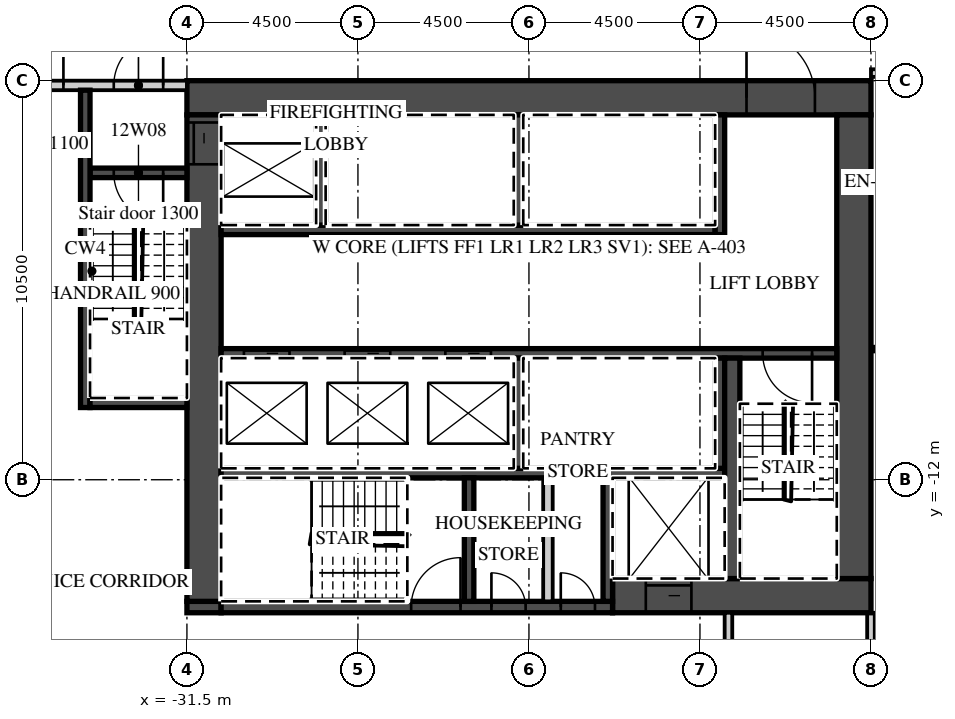
"""IFC4 building model, lengths in metres.
Left out: names, types, materials, properties, quantities, classifications, styles, units other than length and angle.
Written with IfcOpenShell. Run it as: python <this file> out.ifc"""

import sys

from ifc_helpers import new_model, si_unit, direction, frame, frame_2d, origin, place, context, subcontext, project, spatial, rectangle, extrude, element, fill, save


model = new_model("IFC4")
c1 = context("Model", 3, precision=1e-05, world=origin(), true_north=direction((0.0, 1.0)))
c2 = subcontext(c1, "Body", "Model", "MODEL_VIEW")
j1 = project(units=[si_unit("LENGTHUNIT", "METRE"), si_unit("PLANEANGLEUNIT", "RADIAN")], contexts=[c1])
p1 = place(None, origin())
s1 = spatial("IfcSite", under=j1, at=p1, CompositionType="ELEMENT")
p2 = place(p1, origin())
s2 = spatial("IfcBuilding", under=s1, at=p2, CompositionType="ELEMENT")
p3 = place(p2, frame((0.0, 0.0, 69.9)))
s3 = spatial("IfcBuildingStorey", under=s2, at=p3, CompositionType="ELEMENT", Elevation=69.9)
p4 = place(p3, frame((-13.5, -21.55, 0.0), z_axis=(0.0, 0.0, 1.0), x_axis=(0.0, 1.0, 0.0)))
e1 = element("IfcWall", 1, at=p4, inside=s3, PredefinedType="PARTITIONING", context=c2, shape_type="SweptSolid", body=[
    extrude(rectangle(XDim=6.05, YDim=0.2, at=frame_2d((3.025, 0.0))), origin(), (0.0, 0.0, 1.0), 3.02),
])
p5 = place(p3, frame((-13.5, -1.3, 0.0), z_axis=(0.0, 0.0, 1.0), x_axis=(1.0, 0.0, 0.0)))
e2 = element("IfcWall", 2, at=p5, inside=s3, PredefinedType="PARTITIONING", context=c2, shape_type="SweptSolid", body=[
    extrude(rectangle(XDim=58.05, YDim=0.2, at=frame_2d((29.025, 0.0))), origin(), (0.0, 0.0, 1.0), 3.02),
])
p6 = place(p5, frame((2.925, 0.0, 0.0)))
e3 = element("IfcOpeningElement", 3, at=p6, cuts=e2, PredefinedType="OPENING", context=c2, shape_type="SweptSolid", body=[
    extrude(rectangle(XDim=1.0, YDim=2.1, at=frame_2d((0.5, 1.05))), frame((0.0, 0.11, 0.0), z_axis=(0.0, -1.0, 0.0), x_axis=(1.0, 0.0, 0.0)), (0.0, 0.0, 1.0), 0.22),
])
p7 = place(p5, frame((5.075, 0.0, 0.0)))
e4 = element("IfcOpeningElement", 4, at=p7, cuts=e2, PredefinedType="OPENING", context=c2, shape_type="SweptSolid", body=[
    extrude(rectangle(XDim=1.0, YDim=2.1, at=frame_2d((0.5, 1.05))), frame((0.0, 0.11, 0.0), z_axis=(0.0, -1.0, 0.0), x_axis=(1.0, 0.0, 0.0)), (0.0, 0.0, 1.0), 0.22),
])
p8 = place(p5, frame((9.55, 0.0, 0.0)))
e5 = element("IfcOpeningElement", 5, at=p8, cuts=e2, PredefinedType="OPENING", context=c2, shape_type="SweptSolid", body=[
    extrude(rectangle(XDim=1.0, YDim=2.1, at=frame_2d((0.5, 1.05))), frame((0.0, 0.11, 0.0), z_axis=(0.0, -1.0, 0.0), x_axis=(1.0, 0.0, 0.0)), (0.0, 0.0, 1.0), 0.22),
])
p9 = place(p5, frame((18.862, 0.0, 0.0)))
e6 = element("IfcOpeningElement", 6, at=p9, cuts=e2, PredefinedType="OPENING", context=c2, shape_type="SweptSolid", body=[
    extrude(rectangle(XDim=1.2, YDim=2.1, at=frame_2d((0.6, 1.05))), frame((0.0, 0.11, 0.0), z_axis=(0.0, -1.0, 0.0), x_axis=(1.0, 0.0, 0.0)), (0.0, 0.0, 1.0), 0.22),
])
p10 = place(p5, frame((27.862, 0.0, 0.0)))
e7 = element("IfcOpeningElement", 7, at=p10, cuts=e2, PredefinedType="OPENING", context=c2, shape_type="SweptSolid", body=[
    extrude(rectangle(XDim=1.2, YDim=2.1, at=frame_2d((0.6, 1.05))), frame((0.0, 0.11, 0.0), z_axis=(0.0, -1.0, 0.0), x_axis=(1.0, 0.0, 0.0)), (0.0, 0.0, 1.0), 0.22),
])
p11 = place(p5, frame((34.45, 0.0, 0.0)))
e8 = element("IfcOpeningElement", 8, at=p11, cuts=e2, PredefinedType="OPENING", context=c2, shape_type="SweptSolid", body=[
    extrude(rectangle(XDim=1.0, YDim=2.1, at=frame_2d((0.5, 1.05))), frame((0.0, 0.11, 0.0), z_axis=(0.0, -1.0, 0.0), x_axis=(1.0, 0.0, 0.0)), (0.0, 0.0, 1.0), 0.22),
])
p12 = place(p5, frame((38.925, 0.0, 0.0)))
e9 = element("IfcOpeningElement", 9, at=p12, cuts=e2, PredefinedType="OPENING", context=c2, shape_type="SweptSolid", body=[
    extrude(rectangle(XDim=1.0, YDim=2.1, at=frame_2d((0.5, 1.05))), frame((0.0, 0.11, 0.0), z_axis=(0.0, -1.0, 0.0), x_axis=(1.0, 0.0, 0.0)), (0.0, 0.0, 1.0), 0.22),
])
p13 = place(p5, frame((45.862, 0.0, 0.0)))
e10 = element("IfcOpeningElement", 10, at=p13, cuts=e2, PredefinedType="OPENING", context=c2, shape_type="SweptSolid", body=[
    extrude(rectangle(XDim=1.2, YDim=2.1, at=frame_2d((0.6, 1.05))), frame((0.0, 0.11, 0.0), z_axis=(0.0, -1.0, 0.0), x_axis=(1.0, 0.0, 0.0)), (0.0, 0.0, 1.0), 0.22),
])
p14 = place(p5, frame((50.075, 0.0, 0.0)))
e11 = element("IfcOpeningElement", 11, at=p14, cuts=e2, PredefinedType="OPENING", context=c2, shape_type="SweptSolid", body=[
    extrude(rectangle(XDim=1.0, YDim=2.1, at=frame_2d((0.5, 1.05))), frame((0.0, 0.11, 0.0), z_axis=(0.0, -1.0, 0.0), x_axis=(1.0, 0.0, 0.0)), (0.0, 0.0, 1.0), 0.22),
])
p15 = place(p5, frame((56.525, 0.0, 0.0)))
e12 = element("IfcOpeningElement", 12, at=p15, cuts=e2, PredefinedType="OPENING", context=c2, shape_type="SweptSolid", body=[
    extrude(rectangle(XDim=1.0, YDim=2.1, at=frame_2d((0.5, 1.05))), frame((0.0, 0.11, 0.0), z_axis=(0.0, -1.0, 0.0), x_axis=(1.0, 0.0, 0.0)), (0.0, 0.0, 1.0), 0.22),
])
p16 = place(p3, frame((-31.5, -1.95, 0.0), z_axis=(0.0, 0.0, 1.0), x_axis=(1.0, 0.0, 0.0)))
e13 = element("IfcWall", 13, at=p16, inside=s3, PredefinedType="SHEAR", context=c2, shape_type="SweptSolid", body=[
    extrude(rectangle(XDim=18.0, YDim=0.9, at=frame_2d((9.0, 0.0))), origin(), (0.0, 0.0, 1.0), 3.02),
])
p17 = place(p16, frame((14.725, 0.0, 0.0)))
e14 = element("IfcOpeningElement", 14, at=p17, cuts=e13, PredefinedType="OPENING", context=c2, shape_type="SweptSolid", body=[
    extrude(rectangle(XDim=1.8, YDim=2.1, at=frame_2d((0.9, 1.05))), frame((0.0, 0.46, 0.0), z_axis=(0.0, -1.0, 0.0), x_axis=(1.0, 0.0, 0.0)), (0.0, 0.0, 1.0), 0.92),
])
p18 = place(p3, frame((-20.3, -15.05, 0.0), z_axis=(0.0, 0.0, 1.0), x_axis=(1.0, 0.0, 0.0)))
e15 = element("IfcWall", 15, at=p18, inside=s3, PredefinedType="SHEAR", context=c2, shape_type="SweptSolid", body=[
    extrude(rectangle(XDim=6.8, YDim=0.9, at=frame_2d((3.4, 0.0))), origin(), (0.0, 0.0, 1.0), 3.02),
])
p19 = place(p18, frame((0.875, 0.0, 0.0)))
e16 = element("IfcOpeningElement", 16, at=p19, cuts=e15, PredefinedType="OPENING", context=c2, shape_type="SweptSolid", body=[
    extrude(rectangle(XDim=1.2, YDim=2.1, at=frame_2d((0.6, 1.05))), frame((0.0, 0.46, 0.0), z_axis=(0.0, -1.0, 0.0), x_axis=(1.0, 0.0, 0.0)), (0.0, 0.0, 1.0), 0.92),
])
p20 = place(p3, frame((-31.5, -15.35, 0.0), z_axis=(0.0, 0.0, 1.0), x_axis=(1.0, 0.0, 0.0)))
e17 = element("IfcWall", 17, at=p20, inside=s3, PredefinedType="SHEAR", context=c2, shape_type="SweptSolid", body=[
    extrude(rectangle(XDim=0.9, YDim=0.3, at=frame_2d((0.45, 0.0))), origin(), (0.0, 0.0, 1.0), 3.02),
])
p21 = place(p3, frame((-30.6, -15.35, 0.0), z_axis=(0.0, 0.0, 1.0), x_axis=(1.0, 0.0, 0.0)))
e18 = element("IfcWall", 18, at=p21, inside=s3, PredefinedType="SHEAR", context=c2, shape_type="SweptSolid", body=[
    extrude(rectangle(XDim=10.3, YDim=0.3, at=frame_2d((5.15, 0.0))), origin(), (0.0, 0.0, 1.0), 3.02),
])
p22 = place(p21, frame((5.0, 0.0, 0.0)))
e19 = element("IfcOpeningElement", 19, at=p22, cuts=e18, PredefinedType="OPENING", context=c2, shape_type="SweptSolid", body=[
    extrude(rectangle(XDim=1.3, YDim=2.1, at=frame_2d((0.65, 1.05))), frame((0.0, 0.16, 0.0), z_axis=(0.0, -1.0, 0.0), x_axis=(1.0, 0.0, 0.0)), (0.0, 0.0, 1.0), 0.32),
])
p23 = place(p21, frame((7.113, 0.0, 0.0)))
e20 = element("IfcOpeningElement", 20, at=p23, cuts=e18, PredefinedType="OPENING", context=c2, shape_type="SweptSolid", body=[
    extrude(rectangle(XDim=0.9, YDim=2.1, at=frame_2d((0.45, 1.05))), frame((0.0, 0.16, 0.0), z_axis=(0.0, -1.0, 0.0), x_axis=(1.0, 0.0, 0.0)), (0.0, 0.0, 1.0), 0.32),
])
p24 = place(p21, frame((8.938, 0.0, 0.0)))
e21 = element("IfcOpeningElement", 21, at=p24, cuts=e18, PredefinedType="OPENING", context=c2, shape_type="SweptSolid", body=[
    extrude(rectangle(XDim=0.9, YDim=2.1, at=frame_2d((0.45, 1.05))), frame((0.0, 0.16, 0.0), z_axis=(0.0, -1.0, 0.0), x_axis=(1.0, 0.0, 0.0)), (0.0, 0.0, 1.0), 0.32),
])
p25 = place(p3, frame((-31.05, -15.2, 0.0), z_axis=(0.0, 0.0, 1.0), x_axis=(0.0, 1.0, 0.0)))
e22 = element("IfcWall", 22, at=p25, inside=s3, PredefinedType="SHEAR", context=c2, shape_type="SweptSolid", body=[
    extrude(rectangle(XDim=12.8, YDim=0.9, at=frame_2d((6.4, 0.0))), origin(), (0.0, 0.0, 1.0), 3.02),
])
p26 = place(p25, frame((11.5, 0.0, 0.0)))
e23 = element("IfcOpeningElement", 23, at=p26, cuts=e22, PredefinedType="OPENING", context=c2, shape_type="SweptSolid", body=[
    extrude(rectangle(XDim=1.1, YDim=2.1, at=frame_2d((0.55, 1.05))), frame((0.0, 0.46, 0.0), z_axis=(0.0, -1.0, 0.0), x_axis=(1.0, 0.0, 0.0)), (0.0, 0.0, 1.0), 0.92),
])
p27 = place(p3, frame((-13.95, -14.6, 0.0), z_axis=(0.0, 0.0, 1.0), x_axis=(0.0, 1.0, 0.0)))
e24 = element("IfcWall", 24, at=p27, inside=s3, PredefinedType="SHEAR", context=c2, shape_type="SweptSolid", body=[
    extrude(rectangle(XDim=12.2, YDim=0.9, at=frame_2d((6.1, 0.0))), origin(), (0.0, 0.0, 1.0), 3.02),
])
p28 = place(p3, frame((-30.6, -5.425, 0.0), z_axis=(0.0, 0.0, 1.0), x_axis=(1.0, 0.0, 0.0)))
e25 = element("IfcWall", 25, at=p28, inside=s3, PredefinedType="SHEAR", context=c2, shape_type="SweptSolid", body=[
    extrude(rectangle(XDim=13.0, YDim=0.25, at=frame_2d((6.5, 0.0))), origin(), (0.0, 0.0, 1.0), 3.02),
])
p29 = place(p3, frame((-17.475, -5.55, 0.0), z_axis=(0.0, 0.0, 1.0), x_axis=(0.0, 1.0, 0.0)))
e26 = element("IfcWall", 26, at=p29, inside=s3, PredefinedType="SHEAR", context=c2, shape_type="SweptSolid", body=[
    extrude(rectangle(XDim=3.15, YDim=0.25, at=frame_2d((1.575, 0.0))), origin(), (0.0, 0.0, 1.0), 3.02),
])
for number, where, z_axis, x_axis in (
    (27, (-27.975, -5.3, 0.0), (0.0, 0.0, 1.0), (0.0, 1.0, 0.0)),
    (28, (-22.775, -5.3, 0.0), (0.0, 0.0, 1.0), (0.0, 1.0, 0.0)),
):
    element("IfcWall", number, at=place(p3, frame(where, z_axis=z_axis, x_axis=x_axis)), inside=s3, PredefinedType="SHEAR", context=c2, shape_type="SweptSolid", body=[
        extrude(rectangle(XDim=2.9, YDim=0.25, at=frame_2d((1.45, 0.0))), origin(), (0.0, 0.0, 1.0), 3.02),
    ])
p30 = place(p3, frame((-30.6, -8.675, 0.0), z_axis=(0.0, 0.0, 1.0), x_axis=(1.0, 0.0, 0.0)))
e29 = element("IfcWall", 29, at=p30, inside=s3, PredefinedType="SHEAR", context=c2, shape_type="SweptSolid", body=[
    extrude(rectangle(XDim=16.2, YDim=0.25, at=frame_2d((8.1, 0.0))), origin(), (0.0, 0.0, 1.0), 3.02),
])
p31 = place(p30, frame((0.6, 0.0, 0.0)))
e30 = element("IfcOpeningElement", 30, at=p31, cuts=e29, PredefinedType="OPENING", context=c2, shape_type="SweptSolid", body=[
    extrude(rectangle(XDim=1.2, YDim=2.1, at=frame_2d((0.6, 1.05))), frame((0.0, 0.135, 0.0), z_axis=(0.0, -1.0, 0.0), x_axis=(1.0, 0.0, 0.0)), (0.0, 0.0, 1.0), 0.27),
])
p32 = place(p30, frame((3.25, 0.0, 0.0)))
e31 = element("IfcOpeningElement", 31, at=p32, cuts=e29, PredefinedType="OPENING", context=c2, shape_type="SweptSolid", body=[
    extrude(rectangle(XDim=1.2, YDim=2.1, at=frame_2d((0.6, 1.05))), frame((0.0, 0.135, 0.0), z_axis=(0.0, -1.0, 0.0), x_axis=(1.0, 0.0, 0.0)), (0.0, 0.0, 1.0), 0.27),
])
p33 = place(p30, frame((5.9, 0.0, 0.0)))
e32 = element("IfcOpeningElement", 32, at=p33, cuts=e29, PredefinedType="OPENING", context=c2, shape_type="SweptSolid", body=[
    extrude(rectangle(XDim=1.2, YDim=2.1, at=frame_2d((0.6, 1.05))), frame((0.0, 0.135, 0.0), z_axis=(0.0, -1.0, 0.0), x_axis=(1.0, 0.0, 0.0)), (0.0, 0.0, 1.0), 0.27),
])
p34 = place(p30, frame((14.25, 0.0, 0.0)))
e33 = element("IfcOpeningElement", 33, at=p34, cuts=e29, PredefinedType="OPENING", context=c2, shape_type="SweptSolid", body=[
    extrude(rectangle(XDim=1.3, YDim=2.1, at=frame_2d((0.65, 1.05))), frame((0.0, 0.135, 0.0), z_axis=(0.0, -1.0, 0.0), x_axis=(1.0, 0.0, 0.0)), (0.0, 0.0, 1.0), 0.27),
])
p35 = place(p3, frame((-30.6, -11.825, 0.0), z_axis=(0.0, 0.0, 1.0), x_axis=(1.0, 0.0, 0.0)))
e34 = element("IfcWall", 34, at=p35, inside=s3, PredefinedType="SHEAR", context=c2, shape_type="SweptSolid", body=[
    extrude(rectangle(XDim=13.25, YDim=0.25, at=frame_2d((6.625, 0.0))), origin(), (0.0, 0.0, 1.0), 3.02),
])
for number, where, z_axis, x_axis in (
    (35, (-17.475, -11.7, 0.0), (0.0, 0.0, 1.0), (0.0, 1.0, 0.0)),
    (36, (-22.775, -11.7, 0.0), (0.0, 0.0, 1.0), (0.0, 1.0, 0.0)),
):
    element("IfcWall", number, at=place(p3, frame(where, z_axis=z_axis, x_axis=x_axis)), inside=s3, PredefinedType="SHEAR", context=c2, shape_type="SweptSolid", body=[
        extrude(rectangle(XDim=2.9, YDim=0.25, at=frame_2d((1.45, 0.0))), origin(), (0.0, 0.0, 1.0), 3.02),
    ])
p36 = place(p3, frame((-17.15, -14.6, 0.0), z_axis=(0.0, 0.0, 1.0), x_axis=(0.0, 1.0, 0.0)))
e37 = element("IfcWall", 37, at=p36, inside=s3, PredefinedType="SHEAR", context=c2, shape_type="SweptSolid", body=[
    extrude(rectangle(XDim=5.8, YDim=0.4, at=frame_2d((2.9, 0.0))), origin(), (0.0, 0.0, 1.0), 3.02),
])
for number, where, z_axis, x_axis in (
    (38, (-20.425, -15.2, 0.0), (0.0, 0.0, 1.0), (0.0, 1.0, 0.0)),
    (39, (-24.075, -15.2, 0.0), (0.0, 0.0, 1.0), (0.0, 1.0, 0.0)),
):
    element("IfcWall", number, at=place(p3, frame(where, z_axis=z_axis, x_axis=x_axis)), inside=s3, PredefinedType="SHEAR", context=c2, shape_type="SweptSolid", body=[
        extrude(rectangle(XDim=3.25, YDim=0.25, at=frame_2d((1.625, 0.0))), origin(), (0.0, 0.0, 1.0), 3.02),
    ])
p37 = place(p3, frame((-22.0, -15.2, 0.0), z_axis=(0.0, 0.0, 1.0), x_axis=(0.0, 1.0, 0.0)))
e40 = element("IfcWall", 40, at=p37, inside=s3, PredefinedType="PARTITIONING", context=c2, shape_type="SweptSolid", body=[
    extrude(rectangle(XDim=3.25, YDim=0.25, at=frame_2d((1.625, 0.0))), origin(), (0.0, 0.0, 1.0), 3.02),
])
p38 = place(p3, frame((-44.55, -1.625, 0.0), z_axis=(0.0, 0.0, 1.0), x_axis=(1.0, 0.0, 0.0)))
e41 = element("IfcWall", 41, at=p38, inside=s3, PredefinedType="PARTITIONING", context=c2, shape_type="SweptSolid", body=[
    extrude(rectangle(XDim=13.05, YDim=0.25, at=frame_2d((6.525, 0.0))), origin(), (0.0, 0.0, 1.0), 3.02),
])
p39 = place(p38, frame((11.125, 0.0, 0.0)))
e42 = element("IfcOpeningElement", 42, at=p39, cuts=e41, PredefinedType="OPENING", context=c2, shape_type="SweptSolid", body=[
    extrude(rectangle(XDim=1.3, YDim=2.1, at=frame_2d((0.65, 1.05))), frame((0.0, 0.135, 0.0), z_axis=(0.0, -1.0, 0.0), x_axis=(1.0, 0.0, 0.0)), (0.0, 0.0, 1.0), 0.27),
])
p40 = place(p38, frame((8.7, 0.0, 0.0)))
e43 = element("IfcOpeningElement", 43, at=p40, cuts=e41, PredefinedType="OPENING", context=c2, shape_type="SweptSolid", body=[
    extrude(rectangle(XDim=1.1, YDim=2.1, at=frame_2d((0.55, 1.05))), frame((0.0, 0.135, 0.0), z_axis=(0.0, -1.0, 0.0), x_axis=(1.0, 0.0, 0.0)), (0.0, 0.0, 1.0), 0.27),
])
p41 = place(p3, frame((-34.05, -3.925, 0.0), z_axis=(0.0, 0.0, 1.0), x_axis=(1.0, 0.0, 0.0)))
e44 = element("IfcWall", 44, at=p41, inside=s3, PredefinedType="SHEAR", context=c2, shape_type="SweptSolid", body=[
    extrude(rectangle(XDim=2.55, YDim=0.25, at=frame_2d((1.275, 0.0))), origin(), (0.0, 0.0, 1.0), 3.02),
])
p42 = place(p41, frame((0.625, 0.0, 0.0)))
e45 = element("IfcOpeningElement", 45, at=p42, cuts=e44, PredefinedType="OPENING", context=c2, shape_type="SweptSolid", body=[
    extrude(rectangle(XDim=1.3, YDim=2.1, at=frame_2d((0.65, 1.05))), frame((0.0, 0.135, 0.0), z_axis=(0.0, -1.0, 0.0), x_axis=(1.0, 0.0, 0.0)), (0.0, 0.0, 1.0), 0.27),
])
p43 = place(p3, frame((-34.175, -10.1, 0.0), z_axis=(0.0, 0.0, 1.0), x_axis=(0.0, 1.0, 0.0)))
e46 = element("IfcWall", 46, at=p43, inside=s3, PredefinedType="SHEAR", context=c2, shape_type="SweptSolid", body=[
    extrude(rectangle(XDim=8.35, YDim=0.25, at=frame_2d((4.175, 0.0))), origin(), (0.0, 0.0, 1.0), 3.02),
])
p44 = place(p3, frame((-34.05, -9.975, 0.0), z_axis=(0.0, 0.0, 1.0), x_axis=(1.0, 0.0, 0.0)))
e47 = element("IfcWall", 47, at=p44, inside=s3, PredefinedType="SHEAR", context=c2, shape_type="SweptSolid", body=[
    extrude(rectangle(XDim=2.55, YDim=0.25, at=frame_2d((1.275, 0.0))), origin(), (0.0, 0.0, 1.0), 3.02),
])
p45 = place(p3, frame((-17.25, -17.7, 0.0), z_axis=(0.0, 0.0, 1.0), x_axis=(0.0, 1.0, 0.0)))
e48 = element("IfcWall", 48, at=p45, inside=s3, PredefinedType="PARTITIONING", context=c2, shape_type="SweptSolid", body=[
    extrude(rectangle(XDim=2.2, YDim=0.2, at=frame_2d((1.1, 0.0))), origin(), (0.0, 0.0, 1.0), 3.02),
])
p46 = place(p31, origin())
e49 = element("IfcDoor", 49, at=p46, inside=s3, OperationType="SLIDING_TO_LEFT", PredefinedType="DOOR", context=c2, shape_type="SweptSolid", body=[
    extrude(rectangle(XDim=1.2, YDim=2.1, at=frame_2d((0.6, 1.05))), frame((0.0, 0.025, 0.0), z_axis=(0.0, -1.0, 0.0), x_axis=(1.0, 0.0, 0.0)), (0.0, 0.0, 1.0), 0.05),
])
fill(e30, e49)
p47 = place(p32, origin())
e50 = element("IfcDoor", 50, at=p47, inside=s3, OperationType="SLIDING_TO_RIGHT", PredefinedType="DOOR", context=c2, shape_type="SweptSolid", body=[
    extrude(rectangle(XDim=1.2, YDim=2.1, at=frame_2d((0.6, 1.05))), frame((0.0, 0.025, 0.0), z_axis=(0.0, -1.0, 0.0), x_axis=(1.0, 0.0, 0.0)), (0.0, 0.0, 1.0), 0.05),
])
fill(e31, e50)
p48 = place(p33, origin())
e51 = element("IfcDoor", 51, at=p48, inside=s3, OperationType="SLIDING_TO_RIGHT", PredefinedType="DOOR", context=c2, shape_type="SweptSolid", body=[
    extrude(rectangle(XDim=1.2, YDim=2.1, at=frame_2d((0.6, 1.05))), frame((0.0, 0.025, 0.0), z_axis=(0.0, -1.0, 0.0), x_axis=(1.0, 0.0, 0.0)), (0.0, 0.0, 1.0), 0.05),
])
fill(e32, e51)
p49 = place(p19, origin())
e52 = element("IfcDoor", 52, at=p49, inside=s3, OperationType="SLIDING_TO_LEFT", PredefinedType="DOOR", context=c2, shape_type="SweptSolid", body=[
    extrude(rectangle(XDim=1.2, YDim=2.1, at=frame_2d((0.6, 1.05))), frame((0.0, 0.025, 0.0), z_axis=(0.0, -1.0, 0.0), x_axis=(1.0, 0.0, 0.0)), (0.0, 0.0, 1.0), 0.05),
])
fill(e16, e52)
p50 = place(p26, origin())
e53 = element("IfcDoor", 53, at=p50, inside=s3, OperationType="SLIDING_TO_RIGHT", PredefinedType="DOOR", context=c2, shape_type="SweptSolid", body=[
    extrude(rectangle(XDim=1.1, YDim=2.1, at=frame_2d((0.55, 1.05))), frame((0.0, 0.025, 0.0), z_axis=(0.0, -1.0, 0.0), x_axis=(1.0, 0.0, 0.0)), (0.0, 0.0, 1.0), 0.05),
])
fill(e23, e53)
p51 = place(p17, origin())
e54 = element("IfcDoor", 54, at=p51, inside=s3, OperationType="DOUBLE_DOOR_DOUBLE_SWING", PredefinedType="DOOR", context=c2, shape_type="SweptSolid", body=[
    extrude(rectangle(XDim=1.8, YDim=2.1, at=frame_2d((0.9, 1.05))), frame((0.0, 0.025, 0.0), z_axis=(0.0, -1.0, 0.0), x_axis=(1.0, 0.0, 0.0)), (0.0, 0.0, 1.0), 0.05),
])
fill(e14, e54)
p52 = place(p39, origin())
e55 = element("IfcDoor", 55, at=p52, inside=s3, OperationType="SINGLE_SWING_RIGHT", PredefinedType="DOOR", context=c2, shape_type="SweptSolid", body=[
    extrude(rectangle(XDim=1.3, YDim=2.1, at=frame_2d((0.65, 1.05))), frame((0.0, 0.025, 0.0), z_axis=(0.0, -1.0, 0.0), x_axis=(1.0, 0.0, 0.0)), (0.0, 0.0, 1.0), 0.05),
])
fill(e42, e55)
p53 = place(p42, origin())
e56 = element("IfcDoor", 56, at=p53, inside=s3, OperationType="SINGLE_SWING_RIGHT", PredefinedType="DOOR", context=c2, shape_type="SweptSolid", body=[
    extrude(rectangle(XDim=1.3, YDim=2.1, at=frame_2d((0.65, 1.05))), frame((0.0, 0.025, 0.0), z_axis=(0.0, -1.0, 0.0), x_axis=(1.0, 0.0, 0.0)), (0.0, 0.0, 1.0), 0.05),
])
fill(e45, e56)
p54 = place(p40, origin())
e57 = element("IfcDoor", 57, at=p54, inside=s3, OperationType="SINGLE_SWING_RIGHT", PredefinedType="DOOR", context=c2, shape_type="SweptSolid", body=[
    extrude(rectangle(XDim=1.1, YDim=2.1, at=frame_2d((0.55, 1.05))), frame((0.0, 0.025, 0.0), z_axis=(0.0, -1.0, 0.0), x_axis=(1.0, 0.0, 0.0)), (0.0, 0.0, 1.0), 0.05),
])
fill(e43, e57)
p55 = place(p34, origin())
e58 = element("IfcDoor", 58, at=p55, inside=s3, OperationType="SINGLE_SWING_RIGHT", PredefinedType="DOOR", context=c2, shape_type="SweptSolid", body=[
    extrude(rectangle(XDim=1.3, YDim=2.1, at=frame_2d((0.65, 1.05))), frame((0.0, 0.025, 0.0), z_axis=(0.0, -1.0, 0.0), x_axis=(1.0, 0.0, 0.0)), (0.0, 0.0, 1.0), 0.05),
])
fill(e33, e58)
p56 = place(p22, origin())
e59 = element("IfcDoor", 59, at=p56, inside=s3, OperationType="SINGLE_SWING_RIGHT", PredefinedType="DOOR", context=c2, shape_type="SweptSolid", body=[
    extrude(rectangle(XDim=1.3, YDim=2.1, at=frame_2d((0.65, 1.05))), frame((0.0, 0.025, 0.0), z_axis=(0.0, -1.0, 0.0), x_axis=(1.0, 0.0, 0.0)), (0.0, 0.0, 1.0), 0.05),
])
fill(e19, e59)
p57 = place(p23, origin())
e60 = element("IfcDoor", 60, at=p57, inside=s3, OperationType="SINGLE_SWING_LEFT", PredefinedType="DOOR", context=c2, shape_type="SweptSolid", body=[
    extrude(rectangle(XDim=0.9, YDim=2.1, at=frame_2d((0.45, 1.05))), frame((0.0, 0.025, 0.0), z_axis=(0.0, -1.0, 0.0), x_axis=(1.0, 0.0, 0.0)), (0.0, 0.0, 1.0), 0.05),
])
fill(e20, e60)
p58 = place(p24, origin())
e61 = element("IfcDoor", 61, at=p58, inside=s3, OperationType="SINGLE_SWING_LEFT", PredefinedType="DOOR", context=c2, shape_type="SweptSolid", body=[
    extrude(rectangle(XDim=0.9, YDim=2.1, at=frame_2d((0.45, 1.05))), frame((0.0, 0.025, 0.0), z_axis=(0.0, -1.0, 0.0), x_axis=(1.0, 0.0, 0.0)), (0.0, 0.0, 1.0), 0.05),
])
fill(e21, e61)
save(model, sys.argv[1])
